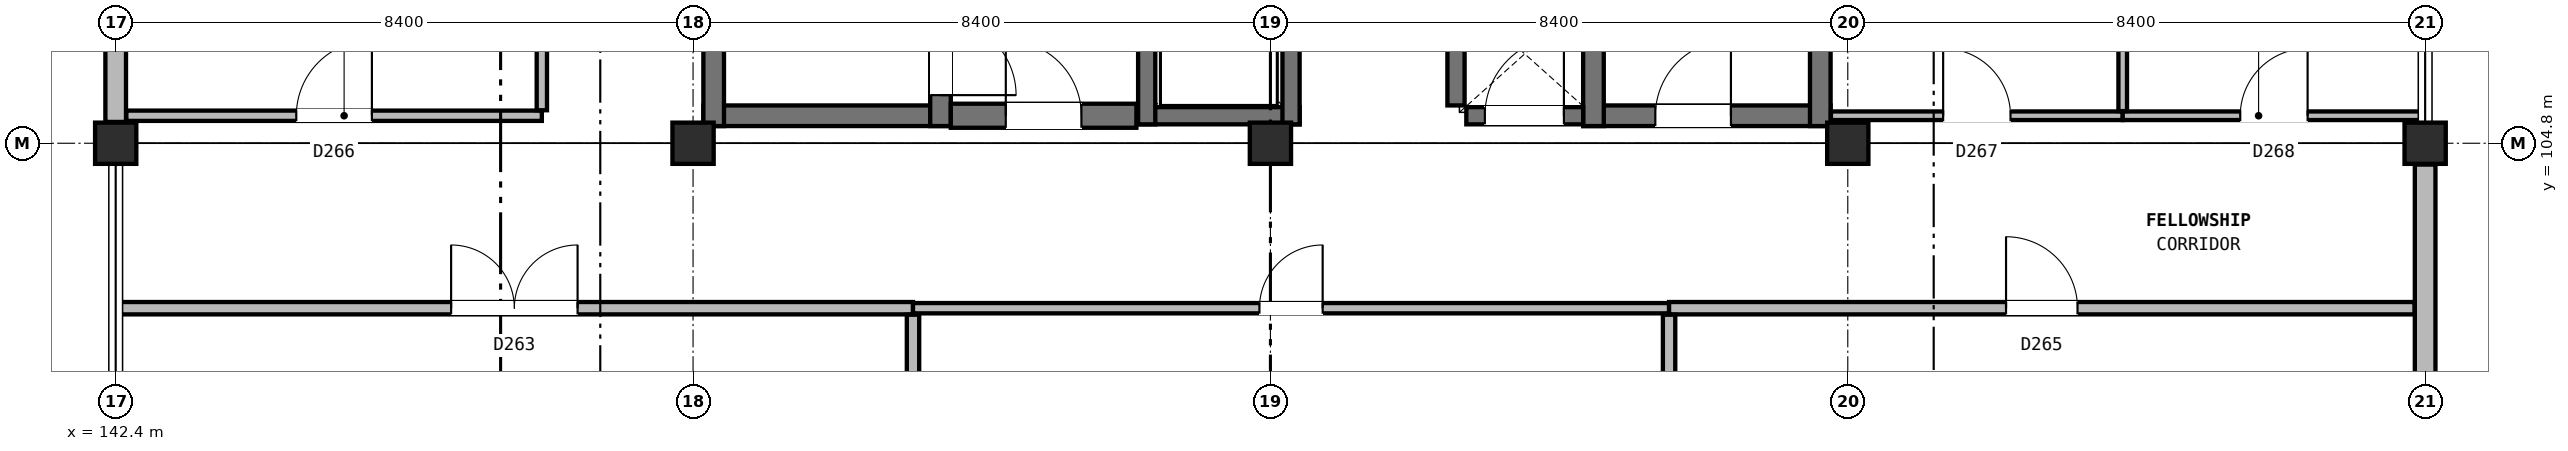
"""IFC4 building model, lengths in metres.
Left out: names, types, materials, properties, quantities, classifications, styles, units other than length and angle.
Written with IfcOpenShell. Run it as: python <this file> out.ifc"""

import sys

from ifc_helpers import new_model, si_unit, direction, frame, frame_2d, origin, origin_2d, place, context, subcontext, project, spatial, rectangle, extrude, element, fill, save


model = new_model("IFC4")
c1 = context("Model", 3, precision=1e-05, world=origin(), true_north=direction((0.0, 1.0)))
c2 = subcontext(c1, "Body", "Model", "MODEL_VIEW")
j1 = project(units=[si_unit("LENGTHUNIT", "METRE"), si_unit("PLANEANGLEUNIT", "RADIAN")], contexts=[c1])
p1 = place(None, origin())
s1 = spatial("IfcSite", under=j1, at=p1, CompositionType="ELEMENT")
p2 = place(p1, origin())
s2 = spatial("IfcBuilding", under=s1, at=p2, CompositionType="ELEMENT")
p3 = place(p2, frame((0.0, 0.0, 52.2)))
s3 = spatial("IfcBuildingStorey", under=s2, at=p3, CompositionType="ELEMENT", Elevation=52.2)
for number, where, z_axis, x_axis in (
    (1, (142.4, 104.8, 0.0), (0.0, 0.0, 1.0), (1.0, 0.0, 0.0)),
    (2, (150.8, 104.8, 0.0), (0.0, 0.0, 1.0), (1.0, 0.0, 0.0)),
    (3, (159.2, 104.8, 0.0), (0.0, 0.0, 1.0), (1.0, 0.0, 0.0)),
    (4, (167.6, 104.8, 0.0), (0.0, 0.0, 1.0), (1.0, 0.0, 0.0)),
    (5, (176.0, 104.8, 0.0), (0.0, 0.0, 1.0), (1.0, 0.0, 0.0)),
):
    element("IfcColumn", number, at=place(p3, frame(where, z_axis=z_axis, x_axis=x_axis)), inside=s3, PredefinedType="COLUMN", context=c2, shape_type="SweptSolid", body=[
        extrude(rectangle(XDim=0.6, YDim=0.6, at=origin_2d()), origin(), (0.0, 0.0, 1.0), 3.8),
    ])
p4 = place(p3, frame((176.0, 96.31, 0.0), z_axis=(0.0, 0.0, 1.0), x_axis=(0.0, 1.0, 0.0)))
e6 = element("IfcWall", 6, at=p4, inside=s3, PredefinedType="SOLIDWALL", context=c2, shape_type="SweptSolid", body=[
    extrude(rectangle(XDim=8.18, YDim=0.3, at=frame_2d((4.09, 0.0))), origin(), (0.0, 0.0, 1.0), 3.05),
])
p5 = place(p4, frame((2.37, 0.0, 0.9)))
e7 = element("IfcOpeningElement", 7, at=p5, cuts=e6, PredefinedType="OPENING", context=c2, shape_type="SweptSolid", body=[
    extrude(rectangle(XDim=1.35, YDim=1.8, at=frame_2d((0.675, 0.9))), frame((0.0, 0.16, 0.0), z_axis=(0.0, -1.0, 0.0), x_axis=(1.0, 0.0, 0.0)), (0.0, 0.0, 1.0), 0.32),
])
p6 = place(p3, frame((142.4, 113.29, 0.0), z_axis=(0.0, 0.0, 1.0), x_axis=(0.0, -1.0, 0.0)))
e8 = element("IfcWall", 8, at=p6, inside=s3, PredefinedType="SOLIDWALL", context=c2, shape_type="SweptSolid", body=[
    extrude(rectangle(XDim=8.18, YDim=0.3, at=frame_2d((4.09, 0.0))), origin(), (0.0, 0.0, 1.0), 3.05),
])
p7 = place(p6, frame((2.92, 0.0, 0.9)))
e9 = element("IfcOpeningElement", 9, at=p7, cuts=e8, PredefinedType="OPENING", context=c2, shape_type="SweptSolid", body=[
    extrude(rectangle(XDim=2.25, YDim=1.95, at=frame_2d((1.125, 0.975))), frame((0.0, 0.16, 0.0), z_axis=(0.0, -1.0, 0.0), x_axis=(1.0, 0.0, 0.0)), (0.0, 0.0, 1.0), 0.32),
])
p8 = place(p3, frame((150.95, 105.2, 0.0), z_axis=(0.0, 0.0, 1.0), x_axis=(1.0, 0.0, 0.0)))
e10 = element("IfcWall", 10, at=p8, inside=s3, PredefinedType="SHEAR", context=c2, shape_type="SweptSolid", body=[
    extrude(rectangle(XDim=3.6, YDim=0.3, at=frame_2d((1.8, 0.0))), origin(), (0.0, 0.0, 1.0), 3.8),
])
p9 = place(p3, frame((151.1, 105.05, 0.0), z_axis=(0.0, 0.0, 1.0), x_axis=(0.0, 1.0, 0.0)))
e11 = element("IfcWall", 11, at=p9, inside=s3, PredefinedType="SHEAR", context=c2, shape_type="SweptSolid", body=[
    extrude(rectangle(XDim=8.3, YDim=0.3, at=frame_2d((4.15, 0.0))), origin(), (0.0, 0.0, 1.0), 3.8),
])
p10 = place(p3, frame((154.4, 105.05, 0.0), z_axis=(0.0, 0.0, 1.0), x_axis=(0.0, 1.0, 0.0)))
e12 = element("IfcWall", 12, at=p10, inside=s3, PredefinedType="SHEAR", context=c2, shape_type="SweptSolid", body=[
    extrude(rectangle(XDim=8.3, YDim=0.3, at=frame_2d((4.15, 0.0))), origin(), (0.0, 0.0, 1.0), 3.8),
])
p11 = place(p10, frame((0.45, 0.0, 0.0)))
e13 = element("IfcOpeningElement", 13, at=p11, cuts=e12, PredefinedType="OPENING", context=c2, shape_type="SweptSolid", body=[
    extrude(rectangle(XDim=1.1, YDim=2.2, at=frame_2d((0.55, 1.1))), frame((0.0, 0.16, 0.0), z_axis=(0.0, -1.0, 0.0), x_axis=(1.0, 0.0, 0.0)), (0.0, 0.0, 1.0), 0.32),
])
p12 = place(p3, frame((163.75, 105.2, 0.0), z_axis=(0.0, 0.0, 1.0), x_axis=(1.0, 0.0, 0.0)))
e14 = element("IfcWall", 14, at=p12, inside=s3, PredefinedType="SHEAR", context=c2, shape_type="SweptSolid", body=[
    extrude(rectangle(XDim=3.6, YDim=0.3, at=frame_2d((1.8, 0.0))), origin(), (0.0, 0.0, 1.0), 3.8),
])
p13 = place(p12, frame((1.05, 0.0, 0.0)))
e15 = element("IfcOpeningElement", 15, at=p13, cuts=e14, PredefinedType="OPENING", context=c2, shape_type="SweptSolid", body=[
    extrude(rectangle(XDim=1.1, YDim=2.2, at=frame_2d((0.55, 1.1))), frame((0.0, 0.16, 0.0), z_axis=(0.0, -1.0, 0.0), x_axis=(1.0, 0.0, 0.0)), (0.0, 0.0, 1.0), 0.32),
])
for number, where, z_axis, x_axis in (
    (16, (163.9, 105.05, 0.0), (0.0, 0.0, 1.0), (0.0, 1.0, 0.0)),
    (17, (167.2, 105.05, 0.0), (0.0, 0.0, 1.0), (0.0, 1.0, 0.0)),
):
    element("IfcWall", number, at=place(p3, frame(where, z_axis=z_axis, x_axis=x_axis)), inside=s3, PredefinedType="SHEAR", context=c2, shape_type="SweptSolid", body=[
        extrude(rectangle(XDim=8.3, YDim=0.3, at=frame_2d((4.15, 0.0))), origin(), (0.0, 0.0, 1.0), 3.8),
    ])
p14 = place(p3, frame((157.275, 105.2, 0.0), z_axis=(0.0, 0.0, 1.0), x_axis=(1.0, 0.0, 0.0)))
e18 = element("IfcWall", 18, at=p14, inside=s3, PredefinedType="SOLIDWALL", context=c2, shape_type="SweptSolid", body=[
    extrude(rectangle(XDim=2.35, YDim=0.25, at=frame_2d((1.175, 0.0))), origin(), (0.0, 0.0, 1.0), 3.48),
])
for number, where, z_axis, x_axis in (
    (19, (157.4, 105.075, 0.0), (0.0, 0.0, 1.0), (0.0, 1.0, 0.0)),
    (20, (159.5, 105.075, 0.0), (0.0, 0.0, 1.0), (0.0, 1.0, 0.0)),
):
    element("IfcWall", number, at=place(p3, frame(where, z_axis=z_axis, x_axis=x_axis)), inside=s3, PredefinedType="SOLIDWALL", context=c2, shape_type="SweptSolid", body=[
        extrude(rectangle(XDim=2.65, YDim=0.25, at=frame_2d((1.325, 0.0))), origin(), (0.0, 0.0, 1.0), 3.48),
    ])
p15 = place(p3, frame((154.55, 105.2, 0.0), z_axis=(0.0, 0.0, 1.0), x_axis=(1.0, 0.0, 0.0)))
e21 = element("IfcWall", 21, at=p15, inside=s3, PredefinedType="SHEAR", context=c2, shape_type="SweptSolid", body=[
    extrude(rectangle(XDim=2.7, YDim=0.35, at=frame_2d((1.35, 0.0))), origin(), (0.0, 0.0, 1.0), 3.48),
])
p16 = place(p15, frame((0.8, 0.0, 0.0)))
e22 = element("IfcOpeningElement", 22, at=p16, cuts=e21, PredefinedType="OPENING", context=c2, shape_type="SweptSolid", body=[
    extrude(rectangle(XDim=1.1, YDim=2.2, at=frame_2d((0.55, 1.1))), frame((0.0, 0.185, 0.0), z_axis=(0.0, -1.0, 0.0), x_axis=(1.0, 0.0, 0.0)), (0.0, 0.0, 1.0), 0.37),
])
p17 = place(p3, frame((161.9, 105.35, 0.0), z_axis=(0.0, 0.0, 1.0), x_axis=(0.0, 1.0, 0.0)))
e23 = element("IfcWall", 23, at=p17, inside=s3, PredefinedType="SOLIDWALL", context=c2, shape_type="SweptSolid", body=[
    extrude(rectangle(XDim=1.5, YDim=0.25, at=frame_2d((0.75, 0.0))), origin(), (0.0, 0.0, 1.0), 3.48),
])
p18 = place(p3, frame((162.05, 105.2, 0.0), z_axis=(0.0, 0.0, 1.0), x_axis=(1.0, 0.0, 0.0)))
e24 = element("IfcWall", 24, at=p18, inside=s3, PredefinedType="SOLIDWALL", context=c2, shape_type="SweptSolid", body=[
    extrude(rectangle(XDim=1.7, YDim=0.25, at=frame_2d((0.85, 0.0))), origin(), (0.0, 0.0, 1.0), 3.48),
])
p19 = place(p18, frame((0.27, 0.0, 0.0)))
e25 = element("IfcOpeningElement", 25, at=p19, cuts=e24, PredefinedType="OPENING", context=c2, shape_type="SweptSolid", body=[
    extrude(rectangle(XDim=1.15, YDim=2.2, at=frame_2d((0.575, 1.1))), frame((0.0, 0.135, 0.0), z_axis=(0.0, -1.0, 0.0), x_axis=(1.0, 0.0, 0.0)), (0.0, 0.0, 1.0), 0.27),
])
p20 = place(p3, frame((142.4, 102.4, 0.0), z_axis=(0.0, 0.0, 1.0), x_axis=(1.0, 0.0, 0.0)))
e26 = element("IfcWall", 26, at=p20, inside=s3, PredefinedType="PARTITIONING", context=c2, shape_type="SweptSolid", body=[
    extrude(rectangle(XDim=11.6, YDim=0.18, at=frame_2d((5.8, 0.0))), origin(), (0.0, 0.0, 1.0), 3.465),
])
p21 = place(p20, frame((4.88, 0.0, 0.0)))
e27 = element("IfcOpeningElement", 27, at=p21, cuts=e26, PredefinedType="OPENING", context=c2, shape_type="SweptSolid", body=[
    extrude(rectangle(XDim=1.84, YDim=2.38, at=frame_2d((0.92, 1.19))), frame((0.0, 0.1, 0.0), z_axis=(0.0, -1.0, 0.0), x_axis=(1.0, 0.0, 0.0)), (0.0, 0.0, 1.0), 0.2),
])
p22 = place(p3, frame((154.0, 102.4, 0.0), z_axis=(0.0, 0.0, 1.0), x_axis=(1.0, 0.0, 0.0)))
e28 = element("IfcWall", 28, at=p22, inside=s3, PredefinedType="PARTITIONING", context=c2, shape_type="SweptSolid", body=[
    extrude(rectangle(XDim=11.0, YDim=0.15, at=frame_2d((5.5, 0.0))), origin(), (0.0, 0.0, 1.0), 3.465),
])
p23 = place(p22, frame((5.04, 0.0, 0.0)))
e29 = element("IfcOpeningElement", 29, at=p23, cuts=e28, PredefinedType="OPENING", context=c2, shape_type="SweptSolid", body=[
    extrude(rectangle(XDim=0.92, YDim=2.1, at=frame_2d((0.46, 1.05))), frame((0.0, 0.085, 0.0), z_axis=(0.0, -1.0, 0.0), x_axis=(1.0, 0.0, 0.0)), (0.0, 0.0, 1.0), 0.17),
])
p24 = place(p3, frame((165.0, 102.4, 0.0), z_axis=(0.0, 0.0, 1.0), x_axis=(1.0, 0.0, 0.0)))
e30 = element("IfcWall", 30, at=p24, inside=s3, PredefinedType="PARTITIONING", context=c2, shape_type="SweptSolid", body=[
    extrude(rectangle(XDim=10.845, YDim=0.18, at=frame_2d((5.422, 0.0))), origin(), (0.0, 0.0, 1.0), 3.465),
])
p25 = place(p24, frame((4.903, 0.0, 0.0)))
e31 = element("IfcOpeningElement", 31, at=p25, cuts=e30, PredefinedType="OPENING", context=c2, shape_type="SweptSolid", body=[
    extrude(rectangle(XDim=1.04, YDim=2.15, at=frame_2d((0.52, 1.075))), frame((0.0, 0.1, 0.0), z_axis=(0.0, -1.0, 0.0), x_axis=(1.0, 0.0, 0.0)), (0.0, 0.0, 1.0), 0.2),
])
p26 = place(p3, frame((142.555, 105.2, 0.0), z_axis=(0.0, 0.0, 1.0), x_axis=(1.0, 0.0, 0.0)))
e32 = element("IfcWall", 32, at=p26, inside=s3, PredefinedType="PARTITIONING", context=c2, shape_type="SweptSolid", body=[
    extrude(rectangle(XDim=6.045, YDim=0.15, at=frame_2d((3.022, 0.0))), origin(), (0.0, 0.0, 1.0), 3.045),
])
p27 = place(p26, frame((2.472, 0.0, 0.0)))
e33 = element("IfcOpeningElement", 33, at=p27, cuts=e32, PredefinedType="OPENING", context=c2, shape_type="SweptSolid", body=[
    extrude(rectangle(XDim=1.1, YDim=2.15, at=frame_2d((0.55, 1.075))), frame((0.0, 0.085, 0.0), z_axis=(0.0, -1.0, 0.0), x_axis=(1.0, 0.0, 0.0)), (0.0, 0.0, 1.0), 0.17),
])
p28 = place(p3, frame((167.355, 105.2, 0.0), z_axis=(0.0, 0.0, 1.0), x_axis=(1.0, 0.0, 0.0)))
e34 = element("IfcWall", 34, at=p28, inside=s3, PredefinedType="PARTITIONING", context=c2, shape_type="SweptSolid", body=[
    extrude(rectangle(XDim=4.245, YDim=0.125, at=frame_2d((2.123, 0.0))), origin(), (0.0, 0.0, 1.0), 3.045),
])
p29 = place(p28, frame((1.633, 0.0, 0.0)))
e35 = element("IfcOpeningElement", 35, at=p29, cuts=e34, PredefinedType="OPENING", context=c2, shape_type="SweptSolid", body=[
    extrude(rectangle(XDim=0.98, YDim=2.1, at=frame_2d((0.49, 1.05))), frame((0.0, 0.073, 0.0), z_axis=(0.0, -1.0, 0.0), x_axis=(1.0, 0.0, 0.0)), (0.0, 0.0, 1.0), 0.145),
])
p30 = place(p3, frame((171.6, 105.2, 0.0), z_axis=(0.0, 0.0, 1.0), x_axis=(1.0, 0.0, 0.0)))
e36 = element("IfcWall", 36, at=p30, inside=s3, PredefinedType="PARTITIONING", context=c2, shape_type="SweptSolid", body=[
    extrude(rectangle(XDim=4.4, YDim=0.125, at=frame_2d((2.2, 0.0))), origin(), (0.0, 0.0, 1.0), 3.045),
])
p31 = place(p30, frame((1.71, 0.0, 0.0)))
e37 = element("IfcOpeningElement", 37, at=p31, cuts=e36, PredefinedType="OPENING", context=c2, shape_type="SweptSolid", body=[
    extrude(rectangle(XDim=0.98, YDim=2.1, at=frame_2d((0.49, 1.05))), frame((0.0, 0.073, 0.0), z_axis=(0.0, -1.0, 0.0), x_axis=(1.0, 0.0, 0.0)), (0.0, 0.0, 1.0), 0.145),
])
p32 = place(p3, frame((148.6, 105.28, 0.0), z_axis=(0.0, 0.0, 1.0), x_axis=(0.0, 1.0, 0.0)))
e38 = element("IfcWall", 38, at=p32, inside=s3, PredefinedType="PARTITIONING", context=c2, shape_type="SweptSolid", body=[
    extrude(rectangle(XDim=14.12, YDim=0.15, at=frame_2d((7.06, 0.0))), origin(), (0.0, 0.0, 1.0), 3.465),
])
p33 = place(p3, frame((154.0, 87.355, 0.0), z_axis=(0.0, 0.0, 1.0), x_axis=(0.0, 1.0, 0.0)))
e39 = element("IfcWall", 39, at=p33, inside=s3, PredefinedType="PARTITIONING", context=c2, shape_type="SweptSolid", body=[
    extrude(rectangle(XDim=14.95, YDim=0.18, at=frame_2d((7.475, 0.0))), origin(), (0.0, 0.0, 1.0), 3.465),
])
p34 = place(p3, frame((165.0, 87.2, 0.0), z_axis=(0.0, 0.0, 1.0), x_axis=(0.0, 1.0, 0.0)))
e40 = element("IfcWall", 40, at=p34, inside=s3, PredefinedType="PARTITIONING", context=c2, shape_type="SweptSolid", body=[
    extrude(rectangle(XDim=15.105, YDim=0.18, at=frame_2d((7.552, 0.0))), origin(), (0.0, 0.0, 1.0), 3.465),
])
p35 = place(p3, frame((171.6, 105.268, 0.0), z_axis=(0.0, 0.0, 1.0), x_axis=(0.0, 1.0, 0.0)))
e41 = element("IfcWall", 41, at=p35, inside=s3, PredefinedType="PARTITIONING", context=c2, shape_type="SweptSolid", body=[
    extrude(rectangle(XDim=16.978, YDim=0.125, at=frame_2d((8.489, 0.0))), origin(), (0.0, 0.0, 1.0), 3.465),
])
p36 = place(p11, frame((1.1, 0.0, 0.0), z_axis=(0.0, 0.0, 1.0), x_axis=(-1.0, 0.0, 0.0)))
e42 = element("IfcDoor", 42, at=p36, inside=s3, OperationType="SINGLE_SWING_LEFT", PredefinedType="DOOR", context=c2, shape_type="SweptSolid", body=[
    extrude(rectangle(XDim=1.1, YDim=2.2, at=frame_2d((0.55, 1.1))), frame((0.0, 0.025, 0.0), z_axis=(0.0, -1.0, 0.0), x_axis=(1.0, 0.0, 0.0)), (0.0, 0.0, 1.0), 0.05),
])
fill(e13, e42)
p37 = place(p13, origin())
e43 = element("IfcDoor", 43, at=p37, inside=s3, OperationType="SINGLE_SWING_RIGHT", PredefinedType="DOOR", context=c2, shape_type="SweptSolid", body=[
    extrude(rectangle(XDim=1.1, YDim=2.2, at=frame_2d((0.55, 1.1))), frame((0.0, 0.025, 0.0), z_axis=(0.0, -1.0, 0.0), x_axis=(1.0, 0.0, 0.0)), (0.0, 0.0, 1.0), 0.05),
])
fill(e15, e43)
p38 = place(p16, origin())
e44 = element("IfcDoor", 44, at=p38, inside=s3, OperationType="SINGLE_SWING_LEFT", PredefinedType="DOOR", context=c2, shape_type="SweptSolid", body=[
    extrude(rectangle(XDim=1.1, YDim=2.2, at=frame_2d((0.55, 1.1))), frame((0.0, 0.025, 0.0), z_axis=(0.0, -1.0, 0.0), x_axis=(1.0, 0.0, 0.0)), (0.0, 0.0, 1.0), 0.05),
])
fill(e22, e44)
p39 = place(p19, origin())
e45 = element("IfcDoor", 45, at=p39, inside=s3, OperationType="SINGLE_SWING_RIGHT", PredefinedType="DOOR", context=c2, shape_type="SweptSolid", body=[
    extrude(rectangle(XDim=1.15, YDim=2.2, at=frame_2d((0.575, 1.1))), frame((0.0, 0.025, 0.0), z_axis=(0.0, -1.0, 0.0), x_axis=(1.0, 0.0, 0.0)), (0.0, 0.0, 1.0), 0.05),
])
fill(e25, e45)
p40 = place(p21, origin())
e46 = element("IfcDoor", 46, at=p40, inside=s3, OperationType="DOUBLE_DOOR_SINGLE_SWING", PredefinedType="DOOR", context=c2, shape_type="SweptSolid", body=[
    extrude(rectangle(XDim=1.84, YDim=2.38, at=frame_2d((0.92, 1.19))), frame((0.0, 0.025, 0.0), z_axis=(0.0, -1.0, 0.0), x_axis=(1.0, 0.0, 0.0)), (0.0, 0.0, 1.0), 0.05),
])
fill(e27, e46)
p41 = place(p23, origin())
e47 = element("IfcDoor", 47, at=p41, inside=s3, OperationType="SINGLE_SWING_RIGHT", PredefinedType="DOOR", context=c2, shape_type="SweptSolid", body=[
    extrude(rectangle(XDim=0.92, YDim=2.1, at=frame_2d((0.46, 1.05))), frame((0.0, 0.025, 0.0), z_axis=(0.0, -1.0, 0.0), x_axis=(1.0, 0.0, 0.0)), (0.0, 0.0, 1.0), 0.05),
])
fill(e29, e47)
p42 = place(p25, origin())
e48 = element("IfcDoor", 48, at=p42, inside=s3, OperationType="SINGLE_SWING_LEFT", PredefinedType="DOOR", context=c2, shape_type="SweptSolid", body=[
    extrude(rectangle(XDim=1.04, YDim=2.15, at=frame_2d((0.52, 1.075))), frame((0.0, 0.025, 0.0), z_axis=(0.0, -1.0, 0.0), x_axis=(1.0, 0.0, 0.0)), (0.0, 0.0, 1.0), 0.05),
])
fill(e31, e48)
p43 = place(p27, origin())
e49 = element("IfcDoor", 49, at=p43, inside=s3, OperationType="SINGLE_SWING_RIGHT", PredefinedType="DOOR", context=c2, shape_type="SweptSolid", body=[
    extrude(rectangle(XDim=1.1, YDim=2.15, at=frame_2d((0.55, 1.075))), frame((0.0, 0.025, 0.0), z_axis=(0.0, -1.0, 0.0), x_axis=(1.0, 0.0, 0.0)), (0.0, 0.0, 1.0), 0.05),
])
fill(e33, e49)
p44 = place(p29, origin())
e50 = element("IfcDoor", 50, at=p44, inside=s3, OperationType="SINGLE_SWING_LEFT", PredefinedType="DOOR", context=c2, shape_type="SweptSolid", body=[
    extrude(rectangle(XDim=0.98, YDim=2.1, at=frame_2d((0.49, 1.05))), frame((0.0, 0.025, 0.0), z_axis=(0.0, -1.0, 0.0), x_axis=(1.0, 0.0, 0.0)), (0.0, 0.0, 1.0), 0.05),
])
fill(e35, e50)
p45 = place(p31, origin())
e51 = element("IfcDoor", 51, at=p45, inside=s3, OperationType="SINGLE_SWING_RIGHT", PredefinedType="DOOR", context=c2, shape_type="SweptSolid", body=[
    extrude(rectangle(XDim=0.98, YDim=2.1, at=frame_2d((0.49, 1.05))), frame((0.0, 0.025, 0.0), z_axis=(0.0, -1.0, 0.0), x_axis=(1.0, 0.0, 0.0)), (0.0, 0.0, 1.0), 0.05),
])
fill(e37, e51)
save(model, sys.argv[1])
